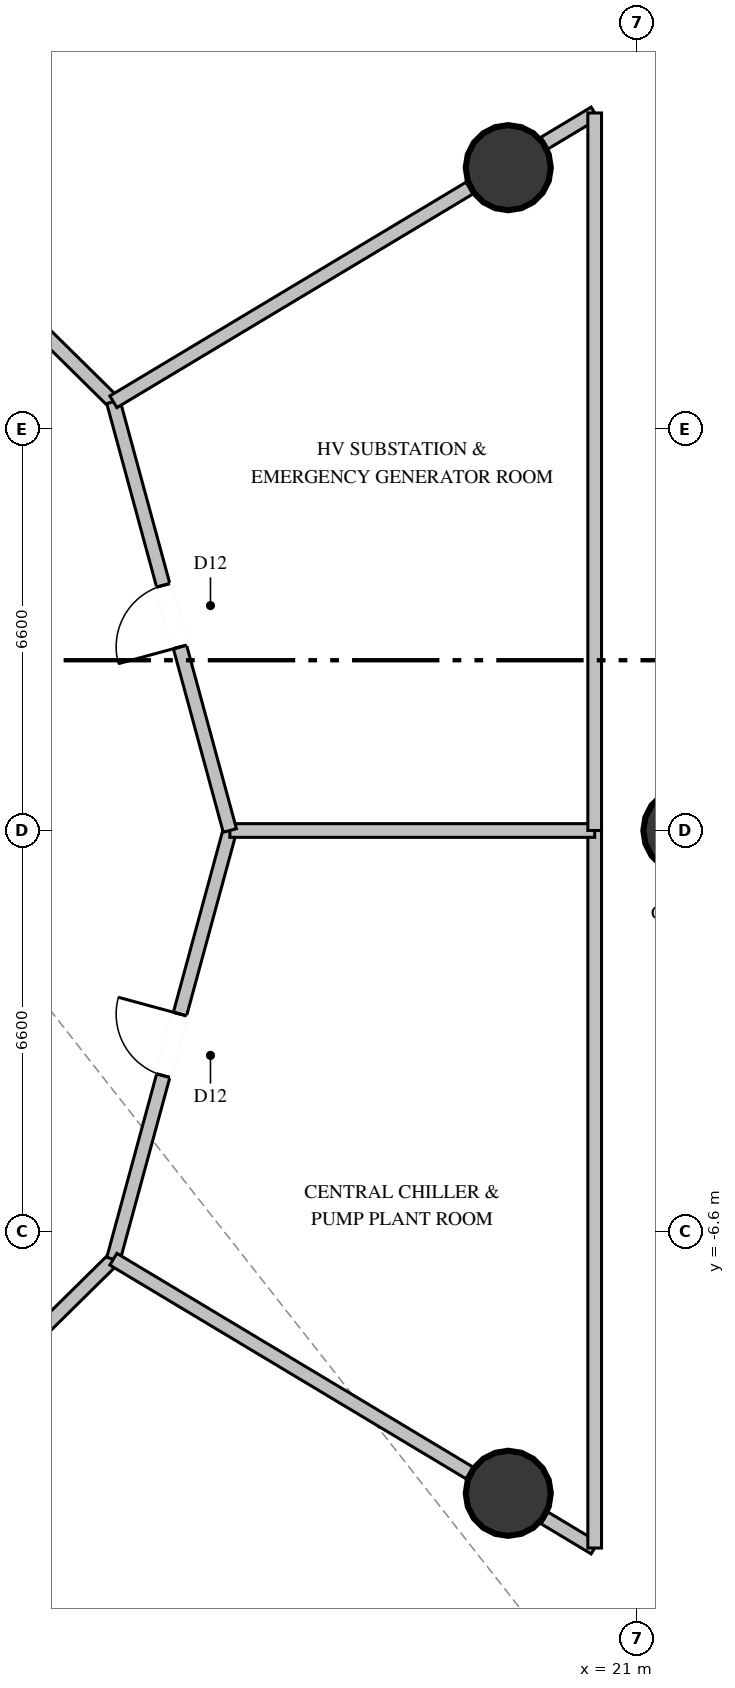
"""IFC4 building model, lengths in metres.
Left out: names, types, materials, properties, quantities, classifications, styles, units other than length and angle.
Written with IfcOpenShell. Run it as: python <this file> out.ifc"""

import sys

from ifc_helpers import new_model, si_unit, direction, frame, frame_2d, origin, origin_2d, place, context, subcontext, project, spatial, rectangle, circle, extrude, element, fill, save


model = new_model("IFC4")
c1 = context("Model", 3, precision=1e-05, world=origin(), true_north=direction((0.0, 1.0)))
c2 = subcontext(c1, "Body", "Model", "MODEL_VIEW")
j1 = project(units=[si_unit("LENGTHUNIT", "METRE"), si_unit("PLANEANGLEUNIT", "RADIAN")], contexts=[c1])
p1 = place(None, origin())
s1 = spatial("IfcSite", under=j1, at=p1, CompositionType="ELEMENT")
p2 = place(p1, origin())
s2 = spatial("IfcBuilding", under=s1, at=p2, CompositionType="ELEMENT")
p3 = place(p2, frame((0.0, 0.0, -9.6)))
s3 = spatial("IfcBuildingStorey", under=s2, at=p3, CompositionType="ELEMENT", Elevation=-9.6)
for number, where, z_axis, x_axis in (
    (1, (21.8, 0.0, 0.0), (0.0, 0.0, 1.0), (1.0, 0.0, 0.0)),
    (2, (18.879, 10.9, 0.0), (0.0, 0.0, 1.0), (1.0, 0.0, 0.0)),
    (3, (18.879, -10.9, 0.0), (0.0, 0.0, 1.0), (1.0, 0.0, 0.0)),
):
    element("IfcColumn", number, at=place(p3, frame(where, z_axis=z_axis, x_axis=x_axis)), inside=s3, PredefinedType="COLUMN", context=c2, shape_type="SweptSolid", body=[
        extrude(circle(Radius=0.7, at=origin_2d()), origin(), (0.0, 0.0, 1.0), 4.8),
    ])
for number, where, z_axis, x_axis in (
    (4, (12.384, 7.05, 0.0), (0.0, 0.0, 1.0), (-0.712, 0.702, 0.0)),
    (5, (7.15, -12.211, 0.0), (0.0, 0.0, 1.0), (0.712, 0.702, 0.0)),
):
    element("IfcWall", number, at=place(p3, frame(where, z_axis=z_axis, x_axis=x_axis)), inside=s3, PredefinedType="PARTITIONING", context=c2, shape_type="SweptSolid", body=[
        extrude(rectangle(XDim=7.351, YDim=0.225, at=frame_2d((3.675, 0.0))), origin(), (0.0, 0.0, 1.0), 4.46),
    ])
p4 = place(p3, frame((12.384, -7.05, 0.0), z_axis=(0.0, 0.0, 1.0), x_axis=(0.262260528785, 0.964997106235, 0.0)))
e6 = element("IfcWall", 6, at=p4, inside=s3, PredefinedType="PARTITIONING", context=c2, shape_type="SweptSolid", body=[
    extrude(rectangle(XDim=7.306, YDim=0.225, at=frame_2d((3.653, 0.0))), origin(), (0.0, 0.0, 1.0), 4.46),
])
p5 = place(p4, frame((3.128, 0.0, 0.0)))
e7 = element("IfcOpeningElement", 7, at=p5, cuts=e6, PredefinedType="OPENING", context=c2, shape_type="SweptSolid", body=[
    extrude(rectangle(XDim=1.05, YDim=2.15, at=frame_2d((0.525, 1.075))), frame((0.0, 0.123, 0.0), z_axis=(0.0, -1.0, 0.0), x_axis=(1.0, 0.0, 0.0)), (0.0, 0.0, 1.0), 0.245),
])
p6 = place(p3, frame((20.3, -11.8, 0.0), z_axis=(0.0, 0.0, 1.0), x_axis=(-0.857425748935, 0.51460770016, 0.0)))
e8 = element("IfcWall", 8, at=p6, inside=s3, PredefinedType="PARTITIONING", context=c2, shape_type="SweptSolid", body=[
    extrude(rectangle(XDim=0.962, YDim=0.225, at=frame_2d((0.481, 0.0))), origin(), (0.0, 0.0, 1.0), 3.695),
])
p7 = place(p3, frame((18.242, -10.565, 0.0), z_axis=(0.0, 0.0, 1.0), x_axis=(-0.857483465664, 0.514511521846, 0.0)))
e9 = element("IfcWall", 9, at=p7, inside=s3, PredefinedType="PARTITIONING", context=c2, shape_type="SweptSolid", body=[
    extrude(rectangle(XDim=6.832, YDim=0.225, at=frame_2d((3.416, 0.0))), origin(), (0.0, 0.0, 1.0), 3.75),
])
p8 = place(p3, frame((20.3, 0.0, 0.0), z_axis=(0.0, 0.0, 1.0), x_axis=(0.0, -1.0, 0.0)))
e10 = element("IfcWall", 10, at=p8, inside=s3, PredefinedType="PARTITIONING", context=c2, shape_type="SweptSolid", body=[
    extrude(rectangle(XDim=11.8, YDim=0.225, at=frame_2d((5.9, 0.0))), origin(), (0.0, 0.0, 1.0), 4.46),
])
p9 = place(p3, frame((14.3, 0.0, 0.0), z_axis=(0.0, 0.0, 1.0), x_axis=(1.0, 0.0, 0.0)))
e11 = element("IfcWall", 11, at=p9, inside=s3, PredefinedType="PARTITIONING", context=c2, shape_type="SweptSolid", body=[
    extrude(rectangle(XDim=6.0, YDim=0.225, at=frame_2d((3.0, 0.0))), origin(), (0.0, 0.0, 1.0), 3.75),
])
p10 = place(p3, frame((14.3, 0.0, 0.0), z_axis=(0.0, 0.0, 1.0), x_axis=(-0.262260528785, 0.964997106235, 0.0)))
e12 = element("IfcWall", 12, at=p10, inside=s3, PredefinedType="PARTITIONING", context=c2, shape_type="SweptSolid", body=[
    extrude(rectangle(XDim=7.306, YDim=0.225, at=frame_2d((3.653, 0.0))), origin(), (0.0, 0.0, 1.0), 4.46),
])
p11 = place(p10, frame((3.128, 0.0, 0.0)))
e13 = element("IfcOpeningElement", 13, at=p11, cuts=e12, PredefinedType="OPENING", context=c2, shape_type="SweptSolid", body=[
    extrude(rectangle(XDim=1.05, YDim=2.15, at=frame_2d((0.525, 1.075))), frame((0.0, 0.123, 0.0), z_axis=(0.0, -1.0, 0.0), x_axis=(1.0, 0.0, 0.0)), (0.0, 0.0, 1.0), 0.245),
])
p12 = place(p3, frame((12.384, 7.05, 0.0), z_axis=(0.0, 0.0, 1.0), x_axis=(0.857483465664, 0.514511521846, 0.0)))
e14 = element("IfcWall", 14, at=p12, inside=s3, PredefinedType="PARTITIONING", context=c2, shape_type="SweptSolid", body=[
    extrude(rectangle(XDim=6.832, YDim=0.225, at=frame_2d((3.416, 0.0))), origin(), (0.0, 0.0, 1.0), 3.75),
])
p13 = place(p3, frame((19.475, 11.305, 0.0), z_axis=(0.0, 0.0, 1.0), x_axis=(0.857425748935, 0.51460770016, 0.0)))
e15 = element("IfcWall", 15, at=p13, inside=s3, PredefinedType="PARTITIONING", context=c2, shape_type="SweptSolid", body=[
    extrude(rectangle(XDim=0.962, YDim=0.225, at=frame_2d((0.481, 0.0))), origin(), (0.0, 0.0, 1.0), 3.695),
])
p14 = place(p3, frame((20.3, 11.8, 0.0), z_axis=(0.0, 0.0, 1.0), x_axis=(0.0, -1.0, 0.0)))
e16 = element("IfcWall", 16, at=p14, inside=s3, PredefinedType="PARTITIONING", context=c2, shape_type="SweptSolid", body=[
    extrude(rectangle(XDim=11.8, YDim=0.225, at=frame_2d((5.9, 0.0))), origin(), (0.0, 0.0, 1.0), 4.46),
])
p15 = place(p5, origin())
e17 = element("IfcDoor", 17, at=p15, inside=s3, OperationType="SINGLE_SWING_RIGHT", PredefinedType="DOOR", context=c2, shape_type="SweptSolid", body=[
    extrude(rectangle(XDim=1.05, YDim=2.15, at=frame_2d((0.525, 1.075))), frame((0.0, 0.025, 0.0), z_axis=(0.0, -1.0, 0.0), x_axis=(1.0, 0.0, 0.0)), (0.0, 0.0, 1.0), 0.05),
])
fill(e7, e17)
p16 = place(p11, origin())
e18 = element("IfcDoor", 18, at=p16, inside=s3, OperationType="SINGLE_SWING_LEFT", PredefinedType="DOOR", context=c2, shape_type="SweptSolid", body=[
    extrude(rectangle(XDim=1.05, YDim=2.15, at=frame_2d((0.525, 1.075))), frame((0.0, 0.025, 0.0), z_axis=(0.0, -1.0, 0.0), x_axis=(1.0, 0.0, 0.0)), (0.0, 0.0, 1.0), 0.05),
])
fill(e13, e18)
save(model, sys.argv[1])
